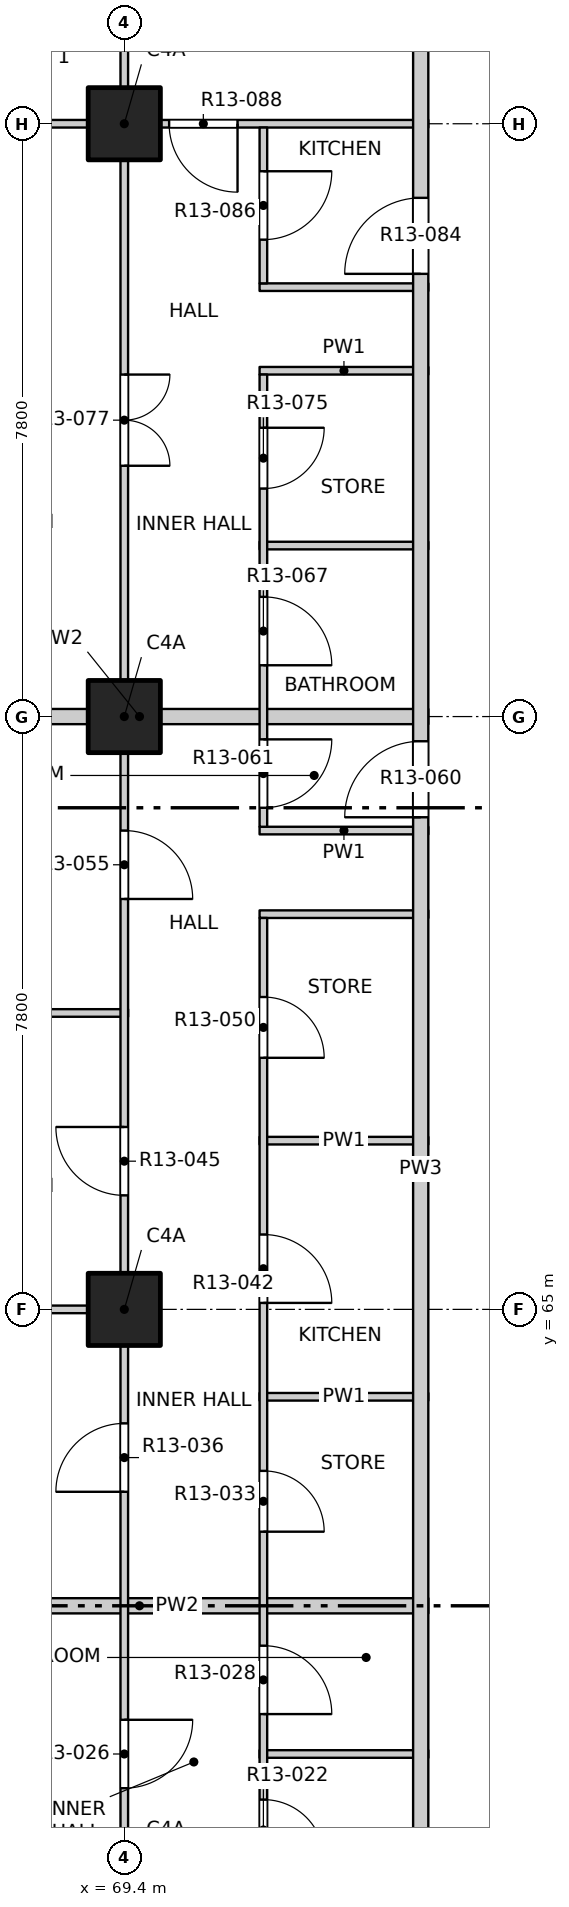
"""IFC4 building model, lengths in metres.
Left out: names, types, materials, properties, quantities, classifications, styles, units other than length and angle.
Written with IfcOpenShell. Run it as: python <this file> out.ifc"""

import sys

from ifc_helpers import new_model, si_unit, direction, frame, frame_2d, origin, origin_2d, place, context, subcontext, project, spatial, rectangle, extrude, element, fill, save


model = new_model("IFC4")
c1 = context("Model", 3, precision=1e-05, world=origin(), true_north=direction((0.0, 1.0)))
c2 = subcontext(c1, "Body", "Model", "MODEL_VIEW")
j1 = project(units=[si_unit("LENGTHUNIT", "METRE"), si_unit("PLANEANGLEUNIT", "RADIAN")], contexts=[c1])
p1 = place(None, origin())
s1 = spatial("IfcSite", under=j1, at=p1, CompositionType="ELEMENT")
p2 = place(p1, origin())
s2 = spatial("IfcBuilding", under=s1, at=p2, CompositionType="ELEMENT")
p3 = place(p2, frame((0.0, 0.0, 140.7)))
s3 = spatial("IfcBuildingStorey", under=s2, at=p3, CompositionType="ELEMENT", Elevation=140.7)
for number, where, z_axis, x_axis in (
    (1, (69.4, 65.0, -0.25), (0.0, 0.0, 1.0), (1.0, 0.0, 0.0)),
    (2, (69.4, 72.8, -0.25), (0.0, 0.0, 1.0), (1.0, 0.0, 0.0)),
    (3, (69.4, 80.6, -0.25), (0.0, 0.0, 1.0), (1.0, 0.0, 0.0)),
):
    element("IfcColumn", number, at=place(p3, frame(where, z_axis=z_axis, x_axis=x_axis)), inside=s3, PredefinedType="COLUMN", context=c2, shape_type="SweptSolid", body=[
        extrude(rectangle(XDim=0.95, YDim=0.95, at=origin_2d()), origin(), (0.0, 0.0, 1.0), 3.35),
    ])
p4 = place(p3, frame((71.18, 59.15, 0.0), z_axis=(0.0, 0.0, 1.0), x_axis=(1.0, 0.0, 0.0)))
e4 = element("IfcWall", 4, at=p4, inside=s3, PredefinedType="PARTITIONING", context=c2, shape_type="SweptSolid", body=[
    extrude(rectangle(XDim=2.22, YDim=0.1, at=frame_2d((1.11, 0.0))), origin(), (0.0, 0.0, 1.0), 3.1),
])
p5 = place(p3, frame((65.8, 61.1, 0.0), z_axis=(0.0, 0.0, 1.0), x_axis=(1.0, 0.0, 0.0)))
e5 = element("IfcWall", 5, at=p5, inside=s3, PredefinedType="PARTITIONING", context=c2, shape_type="SweptSolid", body=[
    extrude(rectangle(XDim=7.6, YDim=0.2, at=frame_2d((3.8, 0.0))), origin(), (0.0, 0.0, 1.0), 3.1),
])
p6 = place(p3, frame((71.18, 63.85, 0.0), z_axis=(0.0, 0.0, 1.0), x_axis=(1.0, 0.0, 0.0)))
e6 = element("IfcWall", 6, at=p6, inside=s3, PredefinedType="PARTITIONING", context=c2, shape_type="SweptSolid", body=[
    extrude(rectangle(XDim=2.22, YDim=0.1, at=frame_2d((1.11, 0.0))), origin(), (0.0, 0.0, 1.0), 3.1),
])
p7 = place(p3, frame((65.8, 65.0, 0.0), z_axis=(0.0, 0.0, 1.0), x_axis=(1.0, 0.0, 0.0)))
e7 = element("IfcWall", 7, at=p7, inside=s3, PredefinedType="PARTITIONING", context=c2, shape_type="SweptSolid", body=[
    extrude(rectangle(XDim=3.65, YDim=0.1, at=frame_2d((1.825, 0.0))), origin(), (0.0, 0.0, 1.0), 3.1),
])
p8 = place(p3, frame((71.18, 67.22, 0.0), z_axis=(0.0, 0.0, 1.0), x_axis=(1.0, 0.0, 0.0)))
e8 = element("IfcWall", 8, at=p8, inside=s3, PredefinedType="PARTITIONING", context=c2, shape_type="SweptSolid", body=[
    extrude(rectangle(XDim=2.22, YDim=0.1, at=frame_2d((1.11, 0.0))), origin(), (0.0, 0.0, 1.0), 3.1),
])
p9 = place(p3, frame((65.8, 68.9, 0.0), z_axis=(0.0, 0.0, 1.0), x_axis=(1.0, 0.0, 0.0)))
e9 = element("IfcWall", 9, at=p9, inside=s3, PredefinedType="PARTITIONING", context=c2, shape_type="SweptSolid", body=[
    extrude(rectangle(XDim=3.65, YDim=0.1, at=frame_2d((1.825, 0.0))), origin(), (0.0, 0.0, 1.0), 3.1),
])
for number, where, z_axis, x_axis in (
    (10, (71.18, 70.2, 0.0), (0.0, 0.0, 1.0), (1.0, 0.0, 0.0)),
    (11, (71.18, 71.3, 0.0), (0.0, 0.0, 1.0), (1.0, 0.0, 0.0)),
):
    element("IfcWall", number, at=place(p3, frame(where, z_axis=z_axis, x_axis=x_axis)), inside=s3, PredefinedType="PARTITIONING", context=c2, shape_type="SweptSolid", body=[
        extrude(rectangle(XDim=2.22, YDim=0.1, at=frame_2d((1.11, 0.0))), origin(), (0.0, 0.0, 1.0), 3.1),
    ])
p10 = place(p3, frame((65.8, 72.8, 0.0), z_axis=(0.0, 0.0, 1.0), x_axis=(1.0, 0.0, 0.0)))
e12 = element("IfcWall", 12, at=p10, inside=s3, PredefinedType="PARTITIONING", context=c2, shape_type="SweptSolid", body=[
    extrude(rectangle(XDim=7.6, YDim=0.2, at=frame_2d((3.8, 0.0))), origin(), (0.0, 0.0, 1.0), 3.1),
])
for number, where, z_axis, x_axis in (
    (13, (71.18, 75.05, 0.0), (0.0, 0.0, 1.0), (1.0, 0.0, 0.0)),
    (14, (71.18, 77.35, 0.0), (0.0, 0.0, 1.0), (1.0, 0.0, 0.0)),
    (15, (71.18, 78.45, 0.0), (0.0, 0.0, 1.0), (1.0, 0.0, 0.0)),
):
    element("IfcWall", number, at=place(p3, frame(where, z_axis=z_axis, x_axis=x_axis)), inside=s3, PredefinedType="PARTITIONING", context=c2, shape_type="SweptSolid", body=[
        extrude(rectangle(XDim=2.22, YDim=0.1, at=frame_2d((1.11, 0.0))), origin(), (0.0, 0.0, 1.0), 3.1),
    ])
p11 = place(p3, frame((65.8, 80.6, 0.0), z_axis=(0.0, 0.0, 1.0), x_axis=(1.0, 0.0, 0.0)))
e16 = element("IfcWall", 16, at=p11, inside=s3, PredefinedType="PARTITIONING", context=c2, shape_type="SweptSolid", body=[
    extrude(rectangle(XDim=7.6, YDim=0.1, at=frame_2d((3.8, 0.0))), origin(), (0.0, 0.0, 1.0), 3.1),
])
p12 = place(p11, frame((4.19, 0.0, 0.0)))
e17 = element("IfcOpeningElement", 17, at=p12, cuts=e16, PredefinedType="OPENING", context=c2, shape_type="SweptSolid", body=[
    extrude(rectangle(XDim=0.9, YDim=2.1, at=frame_2d((0.45, 1.05))), frame((0.0, 0.06, 0.0), z_axis=(0.0, -1.0, 0.0), x_axis=(1.0, 0.0, 0.0)), (0.0, 0.0, 1.0), 0.12),
])
p13 = place(p3, frame((69.4, 45.8, 0.0), z_axis=(0.0, 0.0, 1.0), x_axis=(0.0, 1.0, 0.0)))
e18 = element("IfcWall", 18, at=p13, inside=s3, PredefinedType="PARTITIONING", context=c2, shape_type="SweptSolid", body=[
    extrude(rectangle(XDim=38.4, YDim=0.1, at=frame_2d((19.2, 0.0))), origin(), (0.0, 0.0, 1.0), 3.1),
])
p14 = place(p13, frame((1.05, 0.0, 0.0)))
e19 = element("IfcOpeningElement", 19, at=p14, cuts=e18, PredefinedType="OPENING", context=c2, shape_type="SweptSolid", body=[
    extrude(rectangle(XDim=1.2, YDim=2.1, at=frame_2d((0.6, 1.05))), frame((0.0, 0.06, 0.0), z_axis=(0.0, -1.0, 0.0), x_axis=(1.0, 0.0, 0.0)), (0.0, 0.0, 1.0), 0.12),
])
p15 = place(p13, frame((5.1, 0.0, 0.0)))
e20 = element("IfcOpeningElement", 20, at=p15, cuts=e18, PredefinedType="OPENING", context=c2, shape_type="SweptSolid", body=[
    extrude(rectangle(XDim=0.9, YDim=2.1, at=frame_2d((0.45, 1.05))), frame((0.0, 0.06, 0.0), z_axis=(0.0, -1.0, 0.0), x_axis=(1.0, 0.0, 0.0)), (0.0, 0.0, 1.0), 0.12),
])
p16 = place(p13, frame((9.0, 0.0, 0.0)))
e21 = element("IfcOpeningElement", 21, at=p16, cuts=e18, PredefinedType="OPENING", context=c2, shape_type="SweptSolid", body=[
    extrude(rectangle(XDim=0.9, YDim=2.1, at=frame_2d((0.45, 1.05))), frame((0.0, 0.06, 0.0), z_axis=(0.0, -1.0, 0.0), x_axis=(1.0, 0.0, 0.0)), (0.0, 0.0, 1.0), 0.12),
])
p17 = place(p13, frame((12.9, 0.0, 0.0)))
e22 = element("IfcOpeningElement", 22, at=p17, cuts=e18, PredefinedType="OPENING", context=c2, shape_type="SweptSolid", body=[
    extrude(rectangle(XDim=0.9, YDim=2.1, at=frame_2d((0.45, 1.05))), frame((0.0, 0.06, 0.0), z_axis=(0.0, -1.0, 0.0), x_axis=(1.0, 0.0, 0.0)), (0.0, 0.0, 1.0), 0.12),
])
p18 = place(p13, frame((16.8, 0.0, 0.0)))
e23 = element("IfcOpeningElement", 23, at=p18, cuts=e18, PredefinedType="OPENING", context=c2, shape_type="SweptSolid", body=[
    extrude(rectangle(XDim=0.9, YDim=2.1, at=frame_2d((0.45, 1.05))), frame((0.0, 0.06, 0.0), z_axis=(0.0, -1.0, 0.0), x_axis=(1.0, 0.0, 0.0)), (0.0, 0.0, 1.0), 0.12),
])
p19 = place(p13, frame((20.7, 0.0, 0.0)))
e24 = element("IfcOpeningElement", 24, at=p19, cuts=e18, PredefinedType="OPENING", context=c2, shape_type="SweptSolid", body=[
    extrude(rectangle(XDim=0.9, YDim=2.1, at=frame_2d((0.45, 1.05))), frame((0.0, 0.06, 0.0), z_axis=(0.0, -1.0, 0.0), x_axis=(1.0, 0.0, 0.0)), (0.0, 0.0, 1.0), 0.12),
])
p20 = place(p13, frame((24.6, 0.0, 0.0)))
e25 = element("IfcOpeningElement", 25, at=p20, cuts=e18, PredefinedType="OPENING", context=c2, shape_type="SweptSolid", body=[
    extrude(rectangle(XDim=0.9, YDim=2.1, at=frame_2d((0.45, 1.05))), frame((0.0, 0.06, 0.0), z_axis=(0.0, -1.0, 0.0), x_axis=(1.0, 0.0, 0.0)), (0.0, 0.0, 1.0), 0.12),
])
p21 = place(p13, frame((30.3, 0.0, 0.0)))
e26 = element("IfcOpeningElement", 26, at=p21, cuts=e18, PredefinedType="OPENING", context=c2, shape_type="SweptSolid", body=[
    extrude(rectangle(XDim=1.2, YDim=2.1, at=frame_2d((0.6, 1.05))), frame((0.0, 0.06, 0.0), z_axis=(0.0, -1.0, 0.0), x_axis=(1.0, 0.0, 0.0)), (0.0, 0.0, 1.0), 0.12),
])
p22 = place(p13, frame((36.15, 0.0, 0.0)))
e27 = element("IfcOpeningElement", 27, at=p22, cuts=e18, PredefinedType="OPENING", context=c2, shape_type="SweptSolid", body=[
    extrude(rectangle(XDim=1.2, YDim=2.1, at=frame_2d((0.6, 1.05))), frame((0.0, 0.06, 0.0), z_axis=(0.0, -1.0, 0.0), x_axis=(1.0, 0.0, 0.0)), (0.0, 0.0, 1.0), 0.12),
])
p23 = place(p3, frame((71.23, 55.4, 0.0), z_axis=(0.0, 0.0, 1.0), x_axis=(0.0, 1.0, 0.0)))
e28 = element("IfcWall", 28, at=p23, inside=s3, PredefinedType="PARTITIONING", context=c2, shape_type="SweptSolid", body=[
    extrude(rectangle(XDim=14.75, YDim=0.1, at=frame_2d((7.375, 0.0))), origin(), (0.0, 0.0, 1.0), 3.1),
])
p24 = place(p23, frame((0.4, 0.0, 0.0)))
e29 = element("IfcOpeningElement", 29, at=p24, cuts=e28, PredefinedType="OPENING", context=c2, shape_type="SweptSolid", body=[
    extrude(rectangle(XDim=0.9, YDim=2.1, at=frame_2d((0.45, 1.05))), frame((0.0, 0.06, 0.0), z_axis=(0.0, -1.0, 0.0), x_axis=(1.0, 0.0, 0.0)), (0.0, 0.0, 1.0), 0.12),
])
p25 = place(p23, frame((2.35, 0.0, 0.0)))
e30 = element("IfcOpeningElement", 30, at=p25, cuts=e28, PredefinedType="OPENING", context=c2, shape_type="SweptSolid", body=[
    extrude(rectangle(XDim=0.8, YDim=2.1, at=frame_2d((0.4, 1.05))), frame((0.0, 0.06, 0.0), z_axis=(0.0, -1.0, 0.0), x_axis=(1.0, 0.0, 0.0)), (0.0, 0.0, 1.0), 0.12),
])
p26 = place(p23, frame((4.275, 0.0, 0.0)))
e31 = element("IfcOpeningElement", 31, at=p26, cuts=e28, PredefinedType="OPENING", context=c2, shape_type="SweptSolid", body=[
    extrude(rectangle(XDim=0.9, YDim=2.1, at=frame_2d((0.45, 1.05))), frame((0.0, 0.06, 0.0), z_axis=(0.0, -1.0, 0.0), x_axis=(1.0, 0.0, 0.0)), (0.0, 0.0, 1.0), 0.12),
])
p27 = place(p23, frame((6.675, 0.0, 0.0)))
e32 = element("IfcOpeningElement", 32, at=p27, cuts=e28, PredefinedType="OPENING", context=c2, shape_type="SweptSolid", body=[
    extrude(rectangle(XDim=0.8, YDim=2.1, at=frame_2d((0.4, 1.05))), frame((0.0, 0.06, 0.0), z_axis=(0.0, -1.0, 0.0), x_axis=(1.0, 0.0, 0.0)), (0.0, 0.0, 1.0), 0.12),
])
p28 = place(p23, frame((9.685, 0.0, 0.0)))
e33 = element("IfcOpeningElement", 33, at=p28, cuts=e28, PredefinedType="OPENING", context=c2, shape_type="SweptSolid", body=[
    extrude(rectangle(XDim=0.9, YDim=2.1, at=frame_2d((0.45, 1.05))), frame((0.0, 0.06, 0.0), z_axis=(0.0, -1.0, 0.0), x_axis=(1.0, 0.0, 0.0)), (0.0, 0.0, 1.0), 0.12),
])
p29 = place(p23, frame((12.91, 0.0, 0.0)))
e34 = element("IfcOpeningElement", 34, at=p29, cuts=e28, PredefinedType="OPENING", context=c2, shape_type="SweptSolid", body=[
    extrude(rectangle(XDim=0.8, YDim=2.1, at=frame_2d((0.4, 1.05))), frame((0.0, 0.06, 0.0), z_axis=(0.0, -1.0, 0.0), x_axis=(1.0, 0.0, 0.0)), (0.0, 0.0, 1.0), 0.12),
])
p30 = place(p3, frame((71.23, 71.35, 0.0), z_axis=(0.0, 0.0, 1.0), x_axis=(0.0, 1.0, 0.0)))
e35 = element("IfcWall", 35, at=p30, inside=s3, PredefinedType="PARTITIONING", context=c2, shape_type="SweptSolid", body=[
    extrude(rectangle(XDim=5.95, YDim=0.1, at=frame_2d((2.975, 0.0))), origin(), (0.0, 0.0, 1.0), 3.1),
])
p31 = place(p30, frame((0.25, 0.0, 0.0)))
e36 = element("IfcOpeningElement", 36, at=p31, cuts=e35, PredefinedType="OPENING", context=c2, shape_type="SweptSolid", body=[
    extrude(rectangle(XDim=0.9, YDim=2.1, at=frame_2d((0.45, 1.05))), frame((0.0, 0.06, 0.0), z_axis=(0.0, -1.0, 0.0), x_axis=(1.0, 0.0, 0.0)), (0.0, 0.0, 1.0), 0.12),
])
p32 = place(p30, frame((2.125, 0.0, 0.0)))
e37 = element("IfcOpeningElement", 37, at=p32, cuts=e35, PredefinedType="OPENING", context=c2, shape_type="SweptSolid", body=[
    extrude(rectangle(XDim=0.9, YDim=2.1, at=frame_2d((0.45, 1.05))), frame((0.0, 0.06, 0.0), z_axis=(0.0, -1.0, 0.0), x_axis=(1.0, 0.0, 0.0)), (0.0, 0.0, 1.0), 0.12),
])
p33 = place(p30, frame((4.45, 0.0, 0.0)))
e38 = element("IfcOpeningElement", 38, at=p33, cuts=e35, PredefinedType="OPENING", context=c2, shape_type="SweptSolid", body=[
    extrude(rectangle(XDim=0.8, YDim=2.1, at=frame_2d((0.4, 1.05))), frame((0.0, 0.06, 0.0), z_axis=(0.0, -1.0, 0.0), x_axis=(1.0, 0.0, 0.0)), (0.0, 0.0, 1.0), 0.12),
])
p34 = place(p3, frame((71.23, 78.5, 0.0), z_axis=(0.0, 0.0, 1.0), x_axis=(0.0, 1.0, 0.0)))
e39 = element("IfcWall", 39, at=p34, inside=s3, PredefinedType="PARTITIONING", context=c2, shape_type="SweptSolid", body=[
    extrude(rectangle(XDim=2.05, YDim=0.1, at=frame_2d((1.025, 0.0))), origin(), (0.0, 0.0, 1.0), 3.1),
])
p35 = place(p34, frame((0.575, 0.0, 0.0)))
e40 = element("IfcOpeningElement", 40, at=p35, cuts=e39, PredefinedType="OPENING", context=c2, shape_type="SweptSolid", body=[
    extrude(rectangle(XDim=0.9, YDim=2.1, at=frame_2d((0.45, 1.05))), frame((0.0, 0.06, 0.0), z_axis=(0.0, -1.0, 0.0), x_axis=(1.0, 0.0, 0.0)), (0.0, 0.0, 1.0), 0.12),
])
p36 = place(p3, frame((73.3, 49.5, 0.0), z_axis=(0.0, 0.0, 1.0), x_axis=(0.0, 1.0, 0.0)))
e41 = element("IfcWall", 41, at=p36, inside=s3, PredefinedType="PARTITIONING", context=c2, shape_type="SweptSolid", body=[
    extrude(rectangle(XDim=34.7, YDim=0.2, at=frame_2d((17.35, 0.0))), origin(), (0.0, 0.0, 1.0), 3.1),
])
p37 = place(p36, frame((3.575, 0.0, 0.0)))
e42 = element("IfcOpeningElement", 42, at=p37, cuts=e41, PredefinedType="OPENING", context=c2, shape_type="SweptSolid", body=[
    extrude(rectangle(XDim=1.0, YDim=2.1, at=frame_2d((0.5, 1.05))), frame((0.0, 0.11, 0.0), z_axis=(0.0, -1.0, 0.0), x_axis=(1.0, 0.0, 0.0)), (0.0, 0.0, 1.0), 0.22),
])
p38 = place(p36, frame((21.975, 0.0, 0.0)))
e43 = element("IfcOpeningElement", 43, at=p38, cuts=e41, PredefinedType="OPENING", context=c2, shape_type="SweptSolid", body=[
    extrude(rectangle(XDim=1.0, YDim=2.1, at=frame_2d((0.5, 1.05))), frame((0.0, 0.11, 0.0), z_axis=(0.0, -1.0, 0.0), x_axis=(1.0, 0.0, 0.0)), (0.0, 0.0, 1.0), 0.22),
])
p39 = place(p36, frame((29.125, 0.0, 0.0)))
e44 = element("IfcOpeningElement", 44, at=p39, cuts=e41, PredefinedType="OPENING", context=c2, shape_type="SweptSolid", body=[
    extrude(rectangle(XDim=1.0, YDim=2.1, at=frame_2d((0.5, 1.05))), frame((0.0, 0.11, 0.0), z_axis=(0.0, -1.0, 0.0), x_axis=(1.0, 0.0, 0.0)), (0.0, 0.0, 1.0), 0.22),
])
p40 = place(p25, origin())
e45 = element("IfcDoor", 45, at=p40, inside=s3, OperationType="SINGLE_SWING_RIGHT", PredefinedType="DOOR", context=c2, shape_type="SweptSolid", body=[
    extrude(rectangle(XDim=0.8, YDim=2.1, at=frame_2d((0.4, 1.05))), frame((0.0, 0.025, 0.0), z_axis=(0.0, -1.0, 0.0), x_axis=(1.0, 0.0, 0.0)), (0.0, 0.0, 1.0), 0.05),
])
fill(e30, e45)
p41 = place(p17, origin())
e46 = element("IfcDoor", 46, at=p41, inside=s3, OperationType="SINGLE_SWING_LEFT", PredefinedType="DOOR", context=c2, shape_type="SweptSolid", body=[
    extrude(rectangle(XDim=0.9, YDim=2.1, at=frame_2d((0.45, 1.05))), frame((0.0, 0.025, 0.0), z_axis=(0.0, -1.0, 0.0), x_axis=(1.0, 0.0, 0.0)), (0.0, 0.0, 1.0), 0.05),
])
fill(e22, e46)
p42 = place(p26, origin())
e47 = element("IfcDoor", 47, at=p42, inside=s3, OperationType="SINGLE_SWING_RIGHT", PredefinedType="DOOR", context=c2, shape_type="SweptSolid", body=[
    extrude(rectangle(XDim=0.9, YDim=2.1, at=frame_2d((0.45, 1.05))), frame((0.0, 0.025, 0.0), z_axis=(0.0, -1.0, 0.0), x_axis=(1.0, 0.0, 0.0)), (0.0, 0.0, 1.0), 0.05),
])
fill(e31, e47)
p43 = place(p27, origin())
e48 = element("IfcDoor", 48, at=p43, inside=s3, OperationType="SINGLE_SWING_RIGHT", PredefinedType="DOOR", context=c2, shape_type="SweptSolid", body=[
    extrude(rectangle(XDim=0.8, YDim=2.1, at=frame_2d((0.4, 1.05))), frame((0.0, 0.025, 0.0), z_axis=(0.0, -1.0, 0.0), x_axis=(1.0, 0.0, 0.0)), (0.0, 0.0, 1.0), 0.05),
])
fill(e32, e48)
p44 = place(p18, origin())
e49 = element("IfcDoor", 49, at=p44, inside=s3, OperationType="SINGLE_SWING_LEFT", PredefinedType="DOOR", context=c2, shape_type="SweptSolid", body=[
    extrude(rectangle(XDim=0.9, YDim=2.1, at=frame_2d((0.45, 1.05))), frame((0.0, 0.025, 0.0), z_axis=(0.0, -1.0, 0.0), x_axis=(1.0, 0.0, 0.0)), (0.0, 0.0, 1.0), 0.05),
])
fill(e23, e49)
p45 = place(p28, origin())
e50 = element("IfcDoor", 50, at=p45, inside=s3, OperationType="SINGLE_SWING_RIGHT", PredefinedType="DOOR", context=c2, shape_type="SweptSolid", body=[
    extrude(rectangle(XDim=0.9, YDim=2.1, at=frame_2d((0.45, 1.05))), frame((0.0, 0.025, 0.0), z_axis=(0.0, -1.0, 0.0), x_axis=(1.0, 0.0, 0.0)), (0.0, 0.0, 1.0), 0.05),
])
fill(e33, e50)
p46 = place(p19, origin())
e51 = element("IfcDoor", 51, at=p46, inside=s3, OperationType="SINGLE_SWING_RIGHT", PredefinedType="DOOR", context=c2, shape_type="SweptSolid", body=[
    extrude(rectangle(XDim=0.9, YDim=2.1, at=frame_2d((0.45, 1.05))), frame((0.0, 0.025, 0.0), z_axis=(0.0, -1.0, 0.0), x_axis=(1.0, 0.0, 0.0)), (0.0, 0.0, 1.0), 0.05),
])
fill(e24, e51)
p47 = place(p29, origin())
e52 = element("IfcDoor", 52, at=p47, inside=s3, OperationType="SINGLE_SWING_RIGHT", PredefinedType="DOOR", context=c2, shape_type="SweptSolid", body=[
    extrude(rectangle(XDim=0.8, YDim=2.1, at=frame_2d((0.4, 1.05))), frame((0.0, 0.025, 0.0), z_axis=(0.0, -1.0, 0.0), x_axis=(1.0, 0.0, 0.0)), (0.0, 0.0, 1.0), 0.05),
])
fill(e34, e52)
p48 = place(p20, origin())
e53 = element("IfcDoor", 53, at=p48, inside=s3, OperationType="SINGLE_SWING_RIGHT", PredefinedType="DOOR", context=c2, shape_type="SweptSolid", body=[
    extrude(rectangle(XDim=0.9, YDim=2.1, at=frame_2d((0.45, 1.05))), frame((0.0, 0.025, 0.0), z_axis=(0.0, -1.0, 0.0), x_axis=(1.0, 0.0, 0.0)), (0.0, 0.0, 1.0), 0.05),
])
fill(e25, e53)
p49 = place(p38, origin())
e54 = element("IfcDoor", 54, at=p49, inside=s3, OperationType="SINGLE_SWING_RIGHT", PredefinedType="DOOR", context=c2, shape_type="SweptSolid", body=[
    extrude(rectangle(XDim=1.0, YDim=2.1, at=frame_2d((0.5, 1.05))), frame((0.0, 0.025, 0.0), z_axis=(0.0, -1.0, 0.0), x_axis=(1.0, 0.0, 0.0)), (0.0, 0.0, 1.0), 0.05),
])
fill(e43, e54)
p50 = place(p31, origin())
e55 = element("IfcDoor", 55, at=p50, inside=s3, OperationType="SINGLE_SWING_LEFT", PredefinedType="DOOR", context=c2, shape_type="SweptSolid", body=[
    extrude(rectangle(XDim=0.9, YDim=2.1, at=frame_2d((0.45, 1.05))), frame((0.0, 0.025, 0.0), z_axis=(0.0, -1.0, 0.0), x_axis=(1.0, 0.0, 0.0)), (0.0, 0.0, 1.0), 0.05),
])
fill(e36, e55)
p51 = place(p32, origin())
e56 = element("IfcDoor", 56, at=p51, inside=s3, OperationType="SINGLE_SWING_RIGHT", PredefinedType="DOOR", context=c2, shape_type="SweptSolid", body=[
    extrude(rectangle(XDim=0.9, YDim=2.1, at=frame_2d((0.45, 1.05))), frame((0.0, 0.025, 0.0), z_axis=(0.0, -1.0, 0.0), x_axis=(1.0, 0.0, 0.0)), (0.0, 0.0, 1.0), 0.05),
])
fill(e37, e56)
p52 = place(p33, origin())
e57 = element("IfcDoor", 57, at=p52, inside=s3, OperationType="SINGLE_SWING_LEFT", PredefinedType="DOOR", context=c2, shape_type="SweptSolid", body=[
    extrude(rectangle(XDim=0.8, YDim=2.1, at=frame_2d((0.4, 1.05))), frame((0.0, 0.025, 0.0), z_axis=(0.0, -1.0, 0.0), x_axis=(1.0, 0.0, 0.0)), (0.0, 0.0, 1.0), 0.05),
])
fill(e38, e57)
p53 = place(p21, origin())
e58 = element("IfcDoor", 58, at=p53, inside=s3, OperationType="DOUBLE_DOOR_SINGLE_SWING", PredefinedType="DOOR", context=c2, shape_type="SweptSolid", body=[
    extrude(rectangle(XDim=1.2, YDim=2.1, at=frame_2d((0.6, 1.05))), frame((0.0, 0.025, 0.0), z_axis=(0.0, -1.0, 0.0), x_axis=(1.0, 0.0, 0.0)), (0.0, 0.0, 1.0), 0.05),
])
fill(e26, e58)
p54 = place(p39, origin())
e59 = element("IfcDoor", 59, at=p54, inside=s3, OperationType="SINGLE_SWING_RIGHT", PredefinedType="DOOR", context=c2, shape_type="SweptSolid", body=[
    extrude(rectangle(XDim=1.0, YDim=2.1, at=frame_2d((0.5, 1.05))), frame((0.0, 0.025, 0.0), z_axis=(0.0, -1.0, 0.0), x_axis=(1.0, 0.0, 0.0)), (0.0, 0.0, 1.0), 0.05),
])
fill(e44, e59)
p55 = place(p35, origin())
e60 = element("IfcDoor", 60, at=p55, inside=s3, OperationType="SINGLE_SWING_LEFT", PredefinedType="DOOR", context=c2, shape_type="SweptSolid", body=[
    extrude(rectangle(XDim=0.9, YDim=2.1, at=frame_2d((0.45, 1.05))), frame((0.0, 0.025, 0.0), z_axis=(0.0, -1.0, 0.0), x_axis=(1.0, 0.0, 0.0)), (0.0, 0.0, 1.0), 0.05),
])
fill(e40, e60)
p56 = place(p12, origin())
e61 = element("IfcDoor", 61, at=p56, inside=s3, OperationType="SINGLE_SWING_LEFT", PredefinedType="DOOR", context=c2, shape_type="SweptSolid", body=[
    extrude(rectangle(XDim=0.9, YDim=2.1, at=frame_2d((0.45, 1.05))), frame((0.0, 0.025, 0.0), z_axis=(0.0, -1.0, 0.0), x_axis=(1.0, 0.0, 0.0)), (0.0, 0.0, 1.0), 0.05),
])
fill(e17, e61)
save(model, sys.argv[1])
